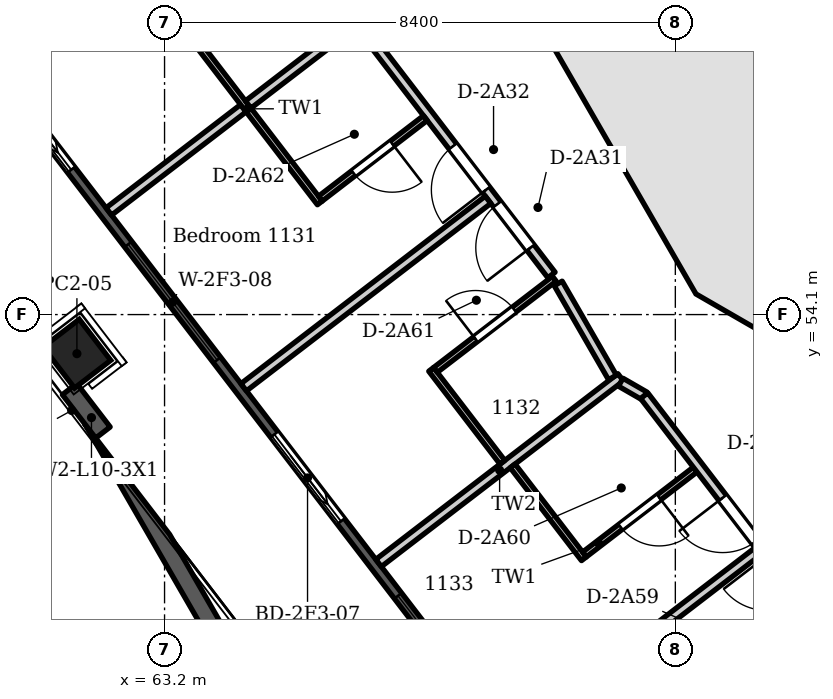
"""IFC4 building model, lengths in metres.
Left out: names, types, materials, properties, quantities, classifications, styles, units other than length and angle.
Written with IfcOpenShell. Run it as: python <this file> out.ifc"""

import sys

from ifc_helpers import new_model, si_unit, direction, frame, frame_2d, origin, origin_2d, place, context, subcontext, project, spatial, polyline, rectangle, outline, extrude, element, fill, save


model = new_model("IFC4")
c1 = context("Model", 3, precision=1e-05, world=origin(), true_north=direction((0.0, 1.0)))
c2 = subcontext(c1, "Body", "Model", "MODEL_VIEW")
j1 = project(units=[si_unit("LENGTHUNIT", "METRE"), si_unit("PLANEANGLEUNIT", "RADIAN")], contexts=[c1])
p1 = place(None, origin())
s1 = spatial("IfcSite", under=j1, at=p1, CompositionType="ELEMENT")
p2 = place(p1, origin())
s2 = spatial("IfcBuilding", under=s1, at=p2, CompositionType="ELEMENT")
p3 = place(p2, frame((0.0, 0.0, 50.4)))
s3 = spatial("IfcBuildingStorey", under=s2, at=p3, CompositionType="ELEMENT", Elevation=50.4)
p4 = place(p3, frame((69.508, 59.85, 0.0), z_axis=(0.0, 0.0, 1.0), x_axis=(0.499979111662, -0.866037463336, 0.0)))
e1 = element("IfcWall", 1, at=p4, inside=s3, PredefinedType="SHEAR", context=c2, shape_type="SweptSolid", body=[
    extrude(outline(polyline([(0.0, -0.6), (5.901, -0.6), (5.58, 0.6), (0.322, 0.6), (0.0, -0.6)])), origin(), (0.0, 0.0, 1.0), 3.6),
])
p5 = place(p4, frame((2.25, 0.0, 0.0)))
e2 = element("IfcOpeningElement", 2, at=p5, cuts=e1, PredefinedType="OPENING", context=c2, shape_type="SweptSolid", body=[
    extrude(rectangle(XDim=1.4, YDim=2.1, at=frame_2d((0.7, 1.05))), frame((0.0, 0.61, 0.0), z_axis=(0.0, -1.0, 0.0), x_axis=(1.0, 0.0, 0.0)), (0.0, 0.0, 1.0), 1.22),
])
p6 = place(p3, frame((72.239, 54.958, 0.0), z_axis=(0.0, 0.0, 1.0), x_axis=(0.866037463336, -0.499979111662, 0.0)))
e3 = element("IfcWall", 3, at=p6, inside=s3, PredefinedType="SHEAR", context=c2, shape_type="SweptSolid", body=[
    extrude(outline(polyline([(0.0, -0.6), (5.901, -0.6), (5.58, 0.6), (0.322, 0.6), (0.0, -0.6)])), origin(), (0.0, 0.0, 1.0), 3.6),
])
p7 = place(p6, frame((1.177, 0.0, 0.0)))
e4 = element("IfcOpeningElement", 4, at=p7, cuts=e3, PredefinedType="OPENING", context=c2, shape_type="SweptSolid", body=[
    extrude(rectangle(XDim=0.9, YDim=2.1, at=frame_2d((0.45, 1.05))), frame((0.0, 0.61, 0.0), z_axis=(0.0, -1.0, 0.0), x_axis=(1.0, 0.0, 0.0)), (0.0, 0.0, 1.0), 1.22),
])
p8 = place(p3, frame((80.354, 60.886, 0.0), z_axis=(0.0, 0.0, 1.0), x_axis=(-0.865986456211, -0.50006745311, 0.0)))
e5 = element("IfcWall", 5, at=p8, inside=s3, PredefinedType="SHEAR", context=c2, shape_type="SweptSolid", body=[
    extrude(rectangle(XDim=9.311, YDim=0.3, at=frame_2d((4.655, 0.0))), origin(), (0.0, 0.0, 1.0), 3.6),
])
p9 = place(p3, frame((61.759, 53.457, -0.35), z_axis=(0.0, 0.0, 1.0), x_axis=(-0.608761429009, 0.793353340291, 0.0)))
e6 = element("IfcColumn", 6, at=p9, inside=s3, PredefinedType="COLUMN", context=c2, shape_type="SweptSolid", body=[
    extrude(rectangle(XDim=0.85, YDim=0.75, at=origin_2d()), origin(), (0.0, 0.0, 1.0), 3.95),
])
p10 = place(p3, frame((79.969, 32.624, 0.0), z_axis=(0.0, 0.0, 1.0), x_axis=(-0.608761526367, 0.793353265585, 0.0)))
e7 = element("IfcWall", 7, at=p10, inside=s3, PredefinedType="SOLIDWALL", context=c2, shape_type="SweptSolid", body=[
    extrude(outline(polyline([(0.149, 0.075), (0.149, -0.075), (47.217, -0.075), (47.217, 0.075), (0.149, 0.075)])), origin(), (0.0, 0.0, 1.0), 3.3),
])
p11 = place(p10, frame((1.222, 0.0, 0.0)))
e8 = element("IfcOpeningElement", 8, at=p11, cuts=e7, PredefinedType="OPENING", context=c2, shape_type="SweptSolid", body=[
    extrude(rectangle(XDim=1.8, YDim=2.6, at=frame_2d((0.9, 1.3))), frame((0.0, 0.085, 0.0), z_axis=(0.0, -1.0, 0.0), x_axis=(1.0, 0.0, 0.0)), (0.0, 0.0, 1.0), 0.17),
])
p12 = place(p10, frame((4.565, 0.0, 0.0)))
e9 = element("IfcOpeningElement", 9, at=p12, cuts=e7, PredefinedType="OPENING", context=c2, shape_type="SweptSolid", body=[
    extrude(rectangle(XDim=1.8, YDim=2.6, at=frame_2d((0.9, 1.3))), frame((0.0, 0.085, 0.0), z_axis=(0.0, -1.0, 0.0), x_axis=(1.0, 0.0, 0.0)), (0.0, 0.0, 1.0), 0.17),
])
p13 = place(p10, frame((8.209, 0.0, 0.0)))
e10 = element("IfcOpeningElement", 10, at=p13, cuts=e7, PredefinedType="OPENING", context=c2, shape_type="SweptSolid", body=[
    extrude(rectangle(XDim=1.8, YDim=2.6, at=frame_2d((0.9, 1.3))), frame((0.0, 0.085, 0.0), z_axis=(0.0, -1.0, 0.0), x_axis=(1.0, 0.0, 0.0)), (0.0, 0.0, 1.0), 0.17),
])
p14 = place(p10, frame((12.453, 0.0, 0.0)))
e11 = element("IfcOpeningElement", 11, at=p14, cuts=e7, PredefinedType="OPENING", context=c2, shape_type="SweptSolid", body=[
    extrude(rectangle(XDim=1.8, YDim=2.6, at=frame_2d((0.9, 1.3))), frame((0.0, 0.085, 0.0), z_axis=(0.0, -1.0, 0.0), x_axis=(1.0, 0.0, 0.0)), (0.0, 0.0, 1.0), 0.17),
])
p15 = place(p10, frame((15.496, 0.0, 0.0)))
e12 = element("IfcOpeningElement", 12, at=p15, cuts=e7, PredefinedType="OPENING", context=c2, shape_type="SweptSolid", body=[
    extrude(rectangle(XDim=1.8, YDim=2.6, at=frame_2d((0.9, 1.3))), frame((0.0, 0.085, 0.0), z_axis=(0.0, -1.0, 0.0), x_axis=(1.0, 0.0, 0.0)), (0.0, 0.0, 1.0), 0.17),
])
p16 = place(p10, frame((18.84, 0.0, 0.15)))
e13 = element("IfcOpeningElement", 13, at=p16, cuts=e7, PredefinedType="OPENING", context=c2, shape_type="SweptSolid", body=[
    extrude(rectangle(XDim=2.4, YDim=2.45, at=frame_2d((1.2, 1.225))), frame((0.0, 0.085, 0.0), z_axis=(0.0, -1.0, 0.0), x_axis=(1.0, 0.0, 0.0)), (0.0, 0.0, 1.0), 0.17),
])
p17 = place(p10, frame((22.783, 0.0, 0.0)))
e14 = element("IfcOpeningElement", 14, at=p17, cuts=e7, PredefinedType="OPENING", context=c2, shape_type="SweptSolid", body=[
    extrude(rectangle(XDim=1.8, YDim=2.6, at=frame_2d((0.9, 1.3))), frame((0.0, 0.085, 0.0), z_axis=(0.0, -1.0, 0.0), x_axis=(1.0, 0.0, 0.0)), (0.0, 0.0, 1.0), 0.17),
])
p18 = place(p10, frame((26.127, 0.0, 0.15)))
e15 = element("IfcOpeningElement", 15, at=p18, cuts=e7, PredefinedType="OPENING", context=c2, shape_type="SweptSolid", body=[
    extrude(rectangle(XDim=2.4, YDim=2.45, at=frame_2d((1.2, 1.225))), frame((0.0, 0.085, 0.0), z_axis=(0.0, -1.0, 0.0), x_axis=(1.0, 0.0, 0.0)), (0.0, 0.0, 1.0), 0.17),
])
p19 = place(p10, frame((30.071, 0.0, 0.0)))
e16 = element("IfcOpeningElement", 16, at=p19, cuts=e7, PredefinedType="OPENING", context=c2, shape_type="SweptSolid", body=[
    extrude(rectangle(XDim=1.8, YDim=2.6, at=frame_2d((0.9, 1.3))), frame((0.0, 0.085, 0.0), z_axis=(0.0, -1.0, 0.0), x_axis=(1.0, 0.0, 0.0)), (0.0, 0.0, 1.0), 0.17),
])
p20 = place(p10, frame((33.114, 0.0, 0.0)))
e17 = element("IfcOpeningElement", 17, at=p20, cuts=e7, PredefinedType="OPENING", context=c2, shape_type="SweptSolid", body=[
    extrude(rectangle(XDim=1.8, YDim=2.6, at=frame_2d((0.9, 1.3))), frame((0.0, 0.085, 0.0), z_axis=(0.0, -1.0, 0.0), x_axis=(1.0, 0.0, 0.0)), (0.0, 0.0, 1.0), 0.17),
])
p21 = place(p10, frame((37.358, 0.0, 0.0)))
e18 = element("IfcOpeningElement", 18, at=p21, cuts=e7, PredefinedType="OPENING", context=c2, shape_type="SweptSolid", body=[
    extrude(rectangle(XDim=1.8, YDim=2.6, at=frame_2d((0.9, 1.3))), frame((0.0, 0.085, 0.0), z_axis=(0.0, -1.0, 0.0), x_axis=(1.0, 0.0, 0.0)), (0.0, 0.0, 1.0), 0.17),
])
p22 = place(p10, frame((41.001, 0.0, 0.0)))
e19 = element("IfcOpeningElement", 19, at=p22, cuts=e7, PredefinedType="OPENING", context=c2, shape_type="SweptSolid", body=[
    extrude(rectangle(XDim=1.8, YDim=2.6, at=frame_2d((0.9, 1.3))), frame((0.0, 0.085, 0.0), z_axis=(0.0, -1.0, 0.0), x_axis=(1.0, 0.0, 0.0)), (0.0, 0.0, 1.0), 0.17),
])
p23 = place(p10, frame((44.345, 0.0, 0.0)))
e20 = element("IfcOpeningElement", 20, at=p23, cuts=e7, PredefinedType="OPENING", context=c2, shape_type="SweptSolid", body=[
    extrude(rectangle(XDim=1.8, YDim=2.6, at=frame_2d((0.9, 1.3))), frame((0.0, 0.085, 0.0), z_axis=(0.0, -1.0, 0.0), x_axis=(1.0, 0.0, 0.0)), (0.0, 0.0, 1.0), 0.17),
])
p24 = place(p3, origin())
e21 = element("IfcWall", 21, at=p24, inside=s3, PredefinedType="PARAPET", context=c2, shape_type="SweptSolid", body=[
    extrude(outline(polyline([(61.885, 52.307), (76.536, 26.931), (76.709, 27.231), (63.284, 50.483), (61.885, 52.307)])), origin(), (0.0, 0.0, 1.0), 1.1),
])
p25 = place(p3, origin())
e22 = element("IfcWall", 22, at=p25, inside=s3, PredefinedType="PARAPET", context=c2, shape_type="SweptSolid", body=[
    extrude(outline(polyline([(62.068, 52.069), (62.306, 52.251), (61.758, 52.966), (61.52, 52.783), (61.691, 52.56), (62.068, 52.069)])), origin(), (0.0, 0.0, 1.0), 1.1),
])
p26 = place(p3, frame((57.534, 70.427, 0.0), z_axis=(0.0, 0.0, 1.0), x_axis=(0.608794371867, -0.793328061261, 0.0)))
e23 = element("IfcWall", 23, at=p26, inside=s3, PredefinedType="PARTITIONING", context=c2, shape_type="SweptSolid", body=[
    extrude(rectangle(XDim=19.759, YDim=0.15, at=frame_2d((9.88, 0.0))), origin(), (0.0, 0.0, 1.0), 3.3),
])
p27 = place(p26, frame((18.293, 0.0, 0.0)))
e24 = element("IfcOpeningElement", 24, at=p27, cuts=e23, PredefinedType="OPENING", context=c2, shape_type="SweptSolid", body=[
    extrude(rectangle(XDim=0.9, YDim=2.1, at=frame_2d((0.45, 1.05))), frame((0.0, 0.085, 0.0), z_axis=(0.0, -1.0, 0.0), x_axis=(1.0, 0.0, 0.0)), (0.0, 0.0, 1.0), 0.17),
])
p28 = place(p26, frame((17.093, 0.0, 0.0)))
e25 = element("IfcOpeningElement", 25, at=p28, cuts=e23, PredefinedType="OPENING", context=c2, shape_type="SweptSolid", body=[
    extrude(rectangle(XDim=0.9, YDim=2.1, at=frame_2d((0.45, 1.05))), frame((0.0, 0.085, 0.0), z_axis=(0.0, -1.0, 0.0), x_axis=(1.0, 0.0, 0.0)), (0.0, 0.0, 1.0), 0.17),
])
p29 = place(p26, frame((11.006, 0.0, 0.0)))
e26 = element("IfcOpeningElement", 26, at=p29, cuts=e23, PredefinedType="OPENING", context=c2, shape_type="SweptSolid", body=[
    extrude(rectangle(XDim=0.9, YDim=2.1, at=frame_2d((0.45, 1.05))), frame((0.0, 0.085, 0.0), z_axis=(0.0, -1.0, 0.0), x_axis=(1.0, 0.0, 0.0)), (0.0, 0.0, 1.0), 0.17),
])
p30 = place(p26, frame((9.806, 0.0, 0.0)))
e27 = element("IfcOpeningElement", 27, at=p30, cuts=e23, PredefinedType="OPENING", context=c2, shape_type="SweptSolid", body=[
    extrude(rectangle(XDim=0.9, YDim=2.1, at=frame_2d((0.45, 1.05))), frame((0.0, 0.085, 0.0), z_axis=(0.0, -1.0, 0.0), x_axis=(1.0, 0.0, 0.0)), (0.0, 0.0, 1.0), 0.17),
])
p31 = place(p3, frame((62.284, 55.795, 0.0), z_axis=(0.0, 0.0, 1.0), x_axis=(0.793280814045, 0.608855935397, 0.0)))
e28 = element("IfcWall", 28, at=p31, inside=s3, PredefinedType="PARTITIONING", context=c2, shape_type="SweptSolid", body=[
    extrude(rectangle(XDim=2.789, YDim=0.15, at=frame_2d((1.395, 0.0))), origin(), (0.0, 0.0, 1.0), 3.3),
])
p32 = place(p3, frame((63.379, 59.031, 0.0), z_axis=(0.0, 0.0, 1.0), x_axis=(0.608627311208, -0.79345623449, 0.0)))
e29 = element("IfcWall", 29, at=p32, inside=s3, PredefinedType="PARTITIONING", context=c2, shape_type="SweptSolid", body=[
    extrude(rectangle(XDim=3.901, YDim=0.1, at=frame_2d((1.95, 0.0))), origin(), (0.0, 0.0, 1.0), 3.3),
])
p33 = place(p3, frame((64.502, 52.904, 0.0), z_axis=(0.0, 0.0, 1.0), x_axis=(0.793351017656, 0.608764455913, 0.0)))
e30 = element("IfcWall", 30, at=p33, inside=s3, PredefinedType="PARTITIONING", context=c2, shape_type="SweptSolid", body=[
    extrude(rectangle(XDim=5.064, YDim=0.15, at=frame_2d((2.532, 0.0))), origin(), (0.0, 0.0, 1.0), 3.3),
])
p34 = place(p3, frame((64.576, 57.554, 0.0), z_axis=(0.0, 0.0, 1.0), x_axis=(0.79342025342, 0.608674216197, 0.0)))
e31 = element("IfcWall", 31, at=p34, inside=s3, PredefinedType="PARTITIONING", context=c2, shape_type="SweptSolid", body=[
    extrude(rectangle(XDim=2.175, YDim=0.15, at=frame_2d((1.088, 0.0))), origin(), (0.0, 0.0, 1.0), 3.3),
])
p35 = place(p3, frame((65.763, 56.006, 0.0), z_axis=(0.0, 0.0, 1.0), x_axis=(0.793203445283, 0.608956726206, 0.0)))
e32 = element("IfcWall", 32, at=p35, inside=s3, PredefinedType="PARTITIONING", context=c2, shape_type="SweptSolid", body=[
    extrude(rectangle(XDim=2.176, YDim=0.1, at=frame_2d((1.088, 0.0))), origin(), (0.0, 0.0, 1.0), 3.3),
])
p36 = place(p35, frame((0.688, 0.0, 0.0)))
e33 = element("IfcOpeningElement", 33, at=p36, cuts=e32, PredefinedType="OPENING", context=c2, shape_type="SweptSolid", body=[
    extrude(rectangle(XDim=0.8, YDim=2.1, at=frame_2d((0.4, 1.05))), frame((0.0, 0.06, 0.0), z_axis=(0.0, -1.0, 0.0), x_axis=(1.0, 0.0, 0.0)), (0.0, 0.0, 1.0), 0.12),
])
p37 = place(p3, frame((66.72, 50.014, 0.0), z_axis=(0.0, 0.0, 1.0), x_axis=(0.793383103562, 0.608722638796, 0.0)))
e34 = element("IfcWall", 34, at=p37, inside=s3, PredefinedType="PARTITIONING", context=c2, shape_type="SweptSolid", body=[
    extrude(rectangle(XDim=5.017, YDim=0.15, at=frame_2d((2.509, 0.0))), origin(), (0.0, 0.0, 1.0), 3.3),
])
p38 = place(p3, frame((67.585, 53.199, 0.0), z_axis=(0.0, 0.0, 1.0), x_axis=(0.608404928037, -0.793626765892, 0.0)))
e35 = element("IfcWall", 35, at=p38, inside=s3, PredefinedType="PARTITIONING", context=c2, shape_type="SweptSolid", body=[
    extrude(rectangle(XDim=1.926, YDim=0.1, at=frame_2d((0.963, 0.0))), origin(), (0.0, 0.0, 1.0), 3.3),
])
p39 = place(p3, frame((67.655, 53.189, 0.0), z_axis=(0.0, 0.0, 1.0), x_axis=(0.79352183508, 0.608541779381, 0.0)))
e36 = element("IfcWall", 36, at=p39, inside=s3, PredefinedType="PARTITIONING", context=c2, shape_type="SweptSolid", body=[
    extrude(rectangle(XDim=2.464, YDim=0.1, at=frame_2d((1.232, 0.0))), origin(), (0.0, 0.0, 1.0), 3.3),
])
p40 = place(p39, frame((0.832, 0.0, 0.0)))
e37 = element("IfcOpeningElement", 37, at=p40, cuts=e36, PredefinedType="OPENING", context=c2, shape_type="SweptSolid", body=[
    extrude(rectangle(XDim=0.8, YDim=2.1, at=frame_2d((0.4, 1.05))), frame((0.0, 0.06, 0.0), z_axis=(0.0, -1.0, 0.0), x_axis=(1.0, 0.0, 0.0)), (0.0, 0.0, 1.0), 0.12),
])
p41 = place(p3, frame((68.925, 51.612, 0.0), z_axis=(0.0, 0.0, 1.0), x_axis=(0.608649853766, -0.793438942522, 0.0)))
e38 = element("IfcWall", 38, at=p41, inside=s3, PredefinedType="PARTITIONING", context=c2, shape_type="SweptSolid", body=[
    extrude(rectangle(XDim=1.925, YDim=0.1, at=frame_2d((0.962, 0.0))), origin(), (0.0, 0.0, 1.0), 3.3),
])
p42 = place(p3, frame((68.938, 47.123, 0.0), z_axis=(0.0, 0.0, 1.0), x_axis=(0.793351017656, 0.608764455913, 0.0)))
e39 = element("IfcWall", 39, at=p42, inside=s3, PredefinedType="PARTITIONING", context=c2, shape_type="SweptSolid", body=[
    extrude(rectangle(XDim=5.064, YDim=0.15, at=frame_2d((2.532, 0.0))), origin(), (0.0, 0.0, 1.0), 3.3),
])
p43 = place(p3, frame((69.674, 54.612, 0.0), z_axis=(0.0, 0.0, 1.0), x_axis=(0.499655352634, -0.866224294616, 0.0)))
e40 = element("IfcWall", 40, at=p43, inside=s3, PredefinedType="PARTITIONING", context=c2, shape_type="SweptSolid", body=[
    extrude(rectangle(XDim=1.785, YDim=0.15, at=frame_2d((0.893, 0.0))), origin(), (0.0, 0.0, 1.0), 3.3),
])
p44 = place(p3, frame((70.106, 50.154, 0.0), z_axis=(0.0, 0.0, 1.0), x_axis=(0.793486347076, 0.608588051972, 0.0)))
e41 = element("IfcWall", 41, at=p44, inside=s3, PredefinedType="PARTITIONING", context=c2, shape_type="SweptSolid", body=[
    extrude(rectangle(XDim=2.292, YDim=0.1, at=frame_2d((1.146, 0.0))), origin(), (0.0, 0.0, 1.0), 3.3),
])
p45 = place(p44, frame((0.746, 0.0, 0.0)))
e42 = element("IfcOpeningElement", 42, at=p45, cuts=e41, PredefinedType="OPENING", context=c2, shape_type="SweptSolid", body=[
    extrude(rectangle(XDim=0.8, YDim=2.1, at=frame_2d((0.4, 1.05))), frame((0.0, 0.06, 0.0), z_axis=(0.0, -1.0, 0.0), x_axis=(1.0, 0.0, 0.0)), (0.0, 0.0, 1.0), 0.12),
])
p46 = place(p3, frame((70.702, 52.988, 0.0), z_axis=(0.0, 0.0, 1.0), x_axis=(0.866382612495, -0.499380785339, 0.0)))
e43 = element("IfcWall", 43, at=p46, inside=s3, PredefinedType="PARTITIONING", context=c2, shape_type="SweptSolid", body=[
    extrude(rectangle(XDim=0.454, YDim=0.15, at=frame_2d((0.227, 0.0))), origin(), (0.0, 0.0, 1.0), 3.3),
])
p47 = place(p3, frame((71.088, 52.766, 0.0), z_axis=(0.0, 0.0, 1.0), x_axis=(0.608663951432, -0.793428127953, 0.0)))
e44 = element("IfcWall", 44, at=p47, inside=s3, PredefinedType="PARTITIONING", context=c2, shape_type="SweptSolid", body=[
    extrude(rectangle(XDim=17.817, YDim=0.15, at=frame_2d((8.909, 0.0))), origin(), (0.0, 0.0, 1.0), 3.3),
])
p48 = place(p47, frame((13.048, 0.0, 0.0)))
e45 = element("IfcOpeningElement", 45, at=p48, cuts=e44, PredefinedType="OPENING", context=c2, shape_type="SweptSolid", body=[
    extrude(rectangle(XDim=0.9, YDim=2.1, at=frame_2d((0.45, 1.05))), frame((0.0, 0.085, 0.0), z_axis=(0.0, -1.0, 0.0), x_axis=(1.0, 0.0, 0.0)), (0.0, 0.0, 1.0), 0.17),
])
p49 = place(p47, frame((8.133, 0.0, 0.0)))
e46 = element("IfcOpeningElement", 46, at=p49, cuts=e44, PredefinedType="OPENING", context=c2, shape_type="SweptSolid", body=[
    extrude(rectangle(XDim=1.0, YDim=2.1, at=frame_2d((0.5, 1.05))), frame((0.0, 0.085, 0.0), z_axis=(0.0, -1.0, 0.0), x_axis=(1.0, 0.0, 0.0)), (0.0, 0.0, 1.0), 0.17),
])
p50 = place(p47, frame((3.318, 0.0, 0.0)))
e47 = element("IfcOpeningElement", 47, at=p50, cuts=e44, PredefinedType="OPENING", context=c2, shape_type="SweptSolid", body=[
    extrude(rectangle(XDim=0.9, YDim=2.1, at=frame_2d((0.45, 1.05))), frame((0.0, 0.085, 0.0), z_axis=(0.0, -1.0, 0.0), x_axis=(1.0, 0.0, 0.0)), (0.0, 0.0, 1.0), 0.17),
])
p51 = place(p47, frame((2.118, 0.0, 0.0)))
e48 = element("IfcOpeningElement", 48, at=p51, cuts=e44, PredefinedType="OPENING", context=c2, shape_type="SweptSolid", body=[
    extrude(rectangle(XDim=0.9, YDim=2.1, at=frame_2d((0.45, 1.05))), frame((0.0, 0.085, 0.0), z_axis=(0.0, -1.0, 0.0), x_axis=(1.0, 0.0, 0.0)), (0.0, 0.0, 1.0), 0.17),
])
p52 = place(p16, origin())
e49 = element("IfcWindow", 49, at=p52, inside=s3, PartitioningType="SINGLE_PANEL", PredefinedType="WINDOW", context=c2, shape_type="SweptSolid", body=[
    extrude(rectangle(XDim=2.4, YDim=2.45, at=frame_2d((1.2, 1.225))), frame((0.0, 0.03, 0.0), z_axis=(0.0, -1.0, 0.0), x_axis=(1.0, 0.0, 0.0)), (0.0, 0.0, 1.0), 0.06),
])
fill(e13, e49)
p53 = place(p17, origin())
e50 = element("IfcDoor", 50, at=p53, inside=s3, OperationType="SLIDING_TO_LEFT", PredefinedType="DOOR", context=c2, shape_type="SweptSolid", body=[
    extrude(rectangle(XDim=1.8, YDim=2.6, at=frame_2d((0.9, 1.3))), frame((0.0, 0.025, 0.0), z_axis=(0.0, -1.0, 0.0), x_axis=(1.0, 0.0, 0.0)), (0.0, 0.0, 1.0), 0.05),
])
fill(e14, e50)
p54 = place(p18, origin())
e51 = element("IfcWindow", 51, at=p54, inside=s3, PartitioningType="SINGLE_PANEL", PredefinedType="WINDOW", context=c2, shape_type="SweptSolid", body=[
    extrude(rectangle(XDim=2.4, YDim=2.45, at=frame_2d((1.2, 1.225))), frame((0.0, 0.03, 0.0), z_axis=(0.0, -1.0, 0.0), x_axis=(1.0, 0.0, 0.0)), (0.0, 0.0, 1.0), 0.06),
])
fill(e15, e51)
p55 = place(p19, origin())
e52 = element("IfcDoor", 52, at=p55, inside=s3, OperationType="SLIDING_TO_LEFT", PredefinedType="DOOR", context=c2, shape_type="SweptSolid", body=[
    extrude(rectangle(XDim=1.8, YDim=2.6, at=frame_2d((0.9, 1.3))), frame((0.0, 0.025, 0.0), z_axis=(0.0, -1.0, 0.0), x_axis=(1.0, 0.0, 0.0)), (0.0, 0.0, 1.0), 0.05),
])
fill(e16, e52)
p56 = place(p51, frame((0.9, 0.0, 0.0), z_axis=(0.0, 0.0, 1.0), x_axis=(-1.0, 0.0, 0.0)))
e53 = element("IfcDoor", 53, at=p56, inside=s3, OperationType="SINGLE_SWING_RIGHT", PredefinedType="DOOR", context=c2, shape_type="SweptSolid", body=[
    extrude(rectangle(XDim=0.9, YDim=2.1, at=frame_2d((0.45, 1.05))), frame((0.0, 0.025, 0.0), z_axis=(0.0, -1.0, 0.0), x_axis=(1.0, 0.0, 0.0)), (0.0, 0.0, 1.0), 0.05),
])
fill(e48, e53)
p57 = place(p27, frame((0.9, 0.0, 0.0), z_axis=(0.0, 0.0, 1.0), x_axis=(-1.0, 0.0, 0.0)))
e54 = element("IfcDoor", 54, at=p57, inside=s3, OperationType="SINGLE_SWING_LEFT", PredefinedType="DOOR", context=c2, shape_type="SweptSolid", body=[
    extrude(rectangle(XDim=0.9, YDim=2.1, at=frame_2d((0.45, 1.05))), frame((0.0, 0.025, 0.0), z_axis=(0.0, -1.0, 0.0), x_axis=(1.0, 0.0, 0.0)), (0.0, 0.0, 1.0), 0.05),
])
fill(e24, e54)
p58 = place(p28, frame((0.9, 0.0, 0.0), z_axis=(0.0, 0.0, 1.0), x_axis=(-1.0, 0.0, 0.0)))
e55 = element("IfcDoor", 55, at=p58, inside=s3, OperationType="SINGLE_SWING_LEFT", PredefinedType="DOOR", context=c2, shape_type="SweptSolid", body=[
    extrude(rectangle(XDim=0.9, YDim=2.1, at=frame_2d((0.45, 1.05))), frame((0.0, 0.025, 0.0), z_axis=(0.0, -1.0, 0.0), x_axis=(1.0, 0.0, 0.0)), (0.0, 0.0, 1.0), 0.05),
])
fill(e25, e55)
p59 = place(p45, frame((0.8, 0.0, 0.0), z_axis=(0.0, 0.0, 1.0), x_axis=(-1.0, 0.0, 0.0)))
e56 = element("IfcDoor", 56, at=p59, inside=s3, OperationType="SINGLE_SWING_LEFT", PredefinedType="DOOR", context=c2, shape_type="SweptSolid", body=[
    extrude(rectangle(XDim=0.8, YDim=2.1, at=frame_2d((0.4, 1.05))), frame((0.0, 0.025, 0.0), z_axis=(0.0, -1.0, 0.0), x_axis=(1.0, 0.0, 0.0)), (0.0, 0.0, 1.0), 0.05),
])
fill(e42, e56)
p60 = place(p40, origin())
e57 = element("IfcDoor", 57, at=p60, inside=s3, OperationType="SINGLE_SWING_LEFT", PredefinedType="DOOR", context=c2, shape_type="SweptSolid", body=[
    extrude(rectangle(XDim=0.8, YDim=2.1, at=frame_2d((0.4, 1.05))), frame((0.0, 0.025, 0.0), z_axis=(0.0, -1.0, 0.0), x_axis=(1.0, 0.0, 0.0)), (0.0, 0.0, 1.0), 0.05),
])
fill(e37, e57)
p61 = place(p36, frame((0.8, 0.0, 0.0), z_axis=(0.0, 0.0, 1.0), x_axis=(-1.0, 0.0, 0.0)))
e58 = element("IfcDoor", 58, at=p61, inside=s3, OperationType="SINGLE_SWING_LEFT", PredefinedType="DOOR", context=c2, shape_type="SweptSolid", body=[
    extrude(rectangle(XDim=0.8, YDim=2.1, at=frame_2d((0.4, 1.05))), frame((0.0, 0.025, 0.0), z_axis=(0.0, -1.0, 0.0), x_axis=(1.0, 0.0, 0.0)), (0.0, 0.0, 1.0), 0.05),
])
fill(e33, e58)
p62 = place(p5, origin())
e59 = element("IfcDoor", 59, at=p62, inside=s3, OperationType="DOUBLE_DOOR_SINGLE_SWING", PredefinedType="DOOR", context=c2, shape_type="SweptSolid", body=[
    extrude(rectangle(XDim=1.4, YDim=2.1, at=frame_2d((0.7, 1.05))), frame((0.0, 0.025, 0.0), z_axis=(0.0, -1.0, 0.0), x_axis=(1.0, 0.0, 0.0)), (0.0, 0.0, 1.0), 0.05),
])
fill(e2, e59)
save(model, sys.argv[1])
